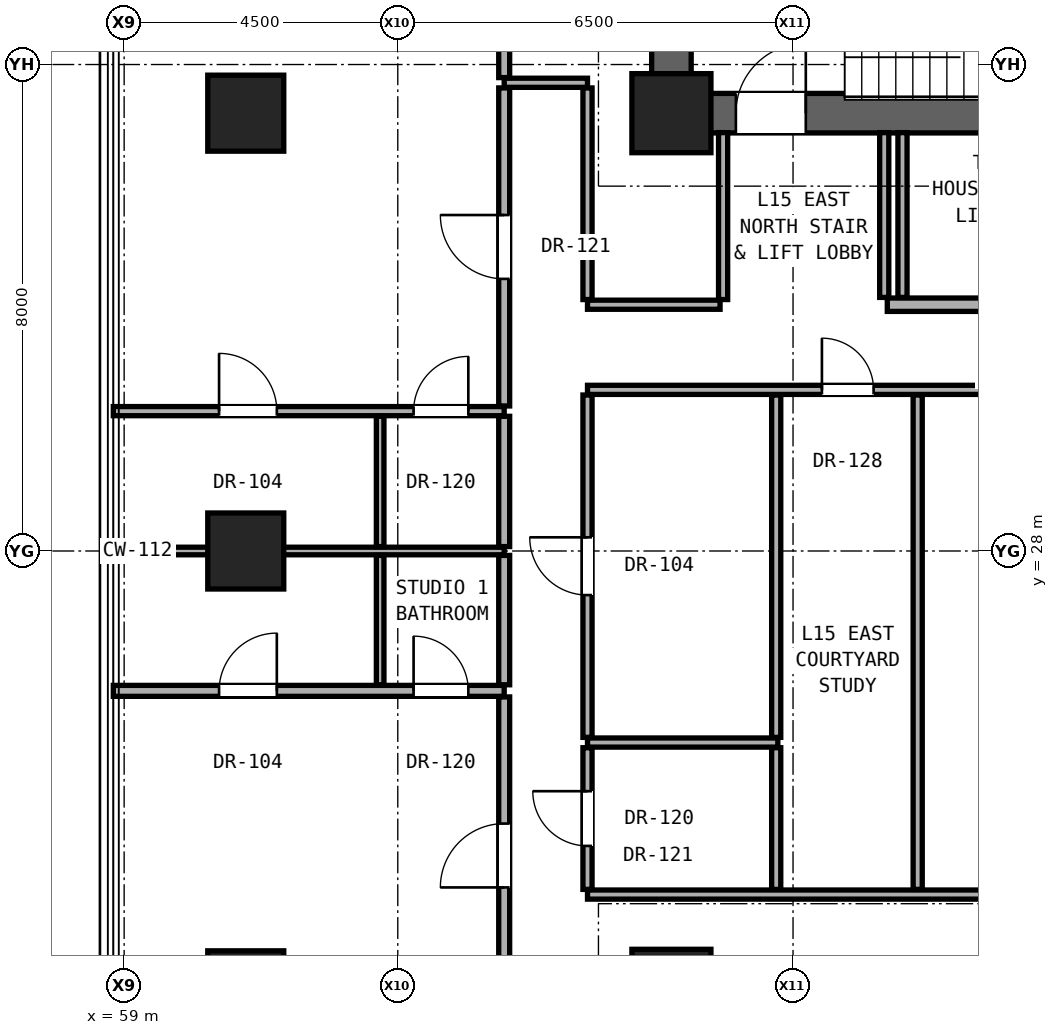
"""IFC4 building model, lengths in metres.
Left out: names, types, materials, properties, quantities, classifications, styles, units other than length and angle.
Written with IfcOpenShell. Run it as: python <this file> out.ifc"""

import sys

from ifc_helpers import new_model, si_unit, direction, frame, frame_2d, origin, origin_2d, place, context, subcontext, project, spatial, rectangle, hollow_rectangle, extrude, element, fill, save


model = new_model("IFC4")
c1 = context("Model", 3, precision=1e-05, world=origin(), true_north=direction((0.0, 1.0)))
c2 = subcontext(c1, "Body", "Model", "MODEL_VIEW")
j1 = project(units=[si_unit("LENGTHUNIT", "METRE"), si_unit("PLANEANGLEUNIT", "RADIAN")], contexts=[c1])
p1 = place(None, origin())
s1 = spatial("IfcSite", under=j1, at=p1, CompositionType="ELEMENT")
p2 = place(p1, origin())
s2 = spatial("IfcBuilding", under=s1, at=p2, CompositionType="ELEMENT")
p3 = place(p2, frame((0.0, 0.0, 55.4)))
s3 = spatial("IfcBuildingStorey", under=s2, at=p3, CompositionType="ELEMENT", Elevation=55.4)
for number, where, z_axis, x_axis in (
    (1, (68.0, 20.8, 0.0), (0.0, 0.0, 1.0), (1.0, 0.0, 0.0)),
    (2, (68.0, 35.2, 0.0), (0.0, 0.0, 1.0), (1.0, 0.0, 0.0)),
):
    element("IfcColumn", number, at=place(p3, frame(where, z_axis=z_axis, x_axis=x_axis)), inside=s3, PredefinedType="COLUMN", context=c2, shape_type="SweptSolid", body=[
        extrude(rectangle(XDim=1.3, YDim=1.3, at=origin_2d()), origin(), (0.0, 0.0, 1.0), 3.3),
    ])
for number, where, z_axis, x_axis in (
    (3, (61.0, 20.8, 0.0), (0.0, 0.0, 1.0), (1.0, 0.0, 0.0)),
    (4, (61.0, 28.0, 0.0), (0.0, 0.0, 1.0), (1.0, 0.0, 0.0)),
    (5, (61.0, 35.2, 0.0), (0.0, 0.0, 1.0), (1.0, 0.0, 0.0)),
):
    element("IfcColumn", number, at=place(p3, frame(where, z_axis=z_axis, x_axis=x_axis)), inside=s3, PredefinedType="COLUMN", context=c2, shape_type="SweptSolid", body=[
        extrude(hollow_rectangle(XDim=1.25, YDim=1.25, WallThickness=0.07, at=origin_2d()), origin(), (0.0, 0.0, 1.0), 3.3),
    ])
p4 = place(p3, frame((68.0, 35.2, 0.0), z_axis=(0.0, 0.0, 1.0), x_axis=(0.0, 1.0, 0.0)))
e6 = element("IfcWall", 6, at=p4, inside=s3, PredefinedType="SHEAR", context=c2, shape_type="SweptSolid", body=[
    extrude(rectangle(XDim=5.6, YDim=0.65, at=frame_2d((2.8, 0.0))), origin(), (0.0, 0.0, 1.0), 3.06),
])
p5 = place(p3, frame((68.0, 35.2, 0.0), z_axis=(0.0, 0.0, 1.0), x_axis=(1.0, 0.0, 0.0)))
e7 = element("IfcWall", 7, at=p5, inside=s3, PredefinedType="SHEAR", context=c2, shape_type="SweptSolid", body=[
    extrude(rectangle(XDim=17.0, YDim=0.65, at=frame_2d((8.5, 0.0))), origin(), (0.0, 0.0, 1.0), 3.06),
])
p6 = place(p5, frame((1.06, 0.0, 0.0)))
e8 = element("IfcOpeningElement", 8, at=p6, cuts=e7, PredefinedType="OPENING", context=c2, shape_type="SweptSolid", body=[
    extrude(rectangle(XDim=1.15, YDim=2.2, at=frame_2d((0.575, 1.1))), frame((0.0, 0.335, 0.0), z_axis=(0.0, -1.0, 0.0), x_axis=(1.0, 0.0, 0.0)), (0.0, 0.0, 1.0), 0.67),
])
p7 = place(p5, frame((8.75, 0.0, 0.0)))
e9 = element("IfcOpeningElement", 9, at=p7, cuts=e7, PredefinedType="OPENING", context=c2, shape_type="SweptSolid", body=[
    extrude(rectangle(XDim=1.4, YDim=2.35, at=frame_2d((0.7, 1.175))), frame((0.0, 0.335, 0.0), z_axis=(0.0, -1.0, 0.0), x_axis=(1.0, 0.0, 0.0)), (0.0, 0.0, 1.0), 0.67),
])
p8 = place(p5, frame((10.77, 0.0, 0.0)))
e10 = element("IfcOpeningElement", 10, at=p8, cuts=e7, PredefinedType="OPENING", context=c2, shape_type="SweptSolid", body=[
    extrude(rectangle(XDim=1.3, YDim=2.3, at=frame_2d((0.65, 1.15))), frame((0.0, 0.335, 0.0), z_axis=(0.0, -1.0, 0.0), x_axis=(1.0, 0.0, 0.0)), (0.0, 0.0, 1.0), 0.67),
])
p9 = place(p5, frame((12.69, 0.0, 0.0)))
e11 = element("IfcOpeningElement", 11, at=p9, cuts=e7, PredefinedType="OPENING", context=c2, shape_type="SweptSolid", body=[
    extrude(rectangle(XDim=1.3, YDim=2.3, at=frame_2d((0.65, 1.15))), frame((0.0, 0.335, 0.0), z_axis=(0.0, -1.0, 0.0), x_axis=(1.0, 0.0, 0.0)), (0.0, 0.0, 1.0), 0.67),
])
p10 = place(p5, frame((14.57, 0.0, 0.0)))
e12 = element("IfcOpeningElement", 12, at=p10, cuts=e7, PredefinedType="OPENING", context=c2, shape_type="SweptSolid", body=[
    extrude(rectangle(XDim=1.3, YDim=2.3, at=frame_2d((0.65, 1.15))), frame((0.0, 0.335, 0.0), z_axis=(0.0, -1.0, 0.0), x_axis=(1.0, 0.0, 0.0)), (0.0, 0.0, 1.0), 0.67),
])
p11 = place(p3, frame((66.62, 22.35, 0.0), z_axis=(0.0, 0.0, 1.0), x_axis=(1.0, 0.0, 0.0)))
e13 = element("IfcWall", 13, at=p11, inside=s3, PredefinedType="PARTITIONING", context=c2, shape_type="SweptSolid", body=[
    extrude(rectangle(XDim=19.63, YDim=0.15, at=frame_2d((9.815, 0.0))), origin(), (0.0, 0.0, 1.0), 2.125),
])
p12 = place(p11, frame((8.129, 0.0, 0.0)))
e14 = element("IfcOpeningElement", 14, at=p12, cuts=e13, PredefinedType="OPENING", context=c2, shape_type="SweptSolid", body=[
    extrude(rectangle(XDim=0.85, YDim=2.01, at=frame_2d((0.425, 1.005))), frame((0.0, 0.085, 0.0), z_axis=(0.0, -1.0, 0.0), x_axis=(1.0, 0.0, 0.0)), (0.0, 0.0, 1.0), 0.17),
])
p13 = place(p3, frame((66.62, 24.85, 0.0), z_axis=(0.0, 0.0, 1.0), x_axis=(1.0, 0.0, 0.0)))
e15 = element("IfcWall", 15, at=p13, inside=s3, PredefinedType="PARTITIONING", context=c2, shape_type="SweptSolid", body=[
    extrude(rectangle(XDim=3.13, YDim=0.15, at=frame_2d((1.565, 0.0))), origin(), (0.0, 0.0, 1.0), 2.125),
])
p14 = place(p3, frame((58.822, 25.7, 0.0), z_axis=(0.0, 0.0, 1.0), x_axis=(1.0, 0.0, 0.0)))
e16 = element("IfcWall", 16, at=p14, inside=s3, PredefinedType="PARTITIONING", context=c2, shape_type="SweptSolid", body=[
    extrude(rectangle(XDim=6.428, YDim=0.18, at=frame_2d((3.214, 0.0))), origin(), (0.0, 0.0, 1.0), 2.196),
])
p15 = place(p14, frame((1.739, 0.0, 0.0)))
e17 = element("IfcOpeningElement", 17, at=p15, cuts=e16, PredefinedType="OPENING", context=c2, shape_type="SweptSolid", body=[
    extrude(rectangle(XDim=0.95, YDim=2.15, at=frame_2d((0.475, 1.075))), frame((0.0, 0.1, 0.0), z_axis=(0.0, -1.0, 0.0), x_axis=(1.0, 0.0, 0.0)), (0.0, 0.0, 1.0), 0.2),
])
p16 = place(p14, frame((4.938, 0.0, 0.0)))
e18 = element("IfcOpeningElement", 18, at=p16, cuts=e16, PredefinedType="OPENING", context=c2, shape_type="SweptSolid", body=[
    extrude(rectangle(XDim=0.9, YDim=2.1, at=frame_2d((0.45, 1.05))), frame((0.0, 0.1, 0.0), z_axis=(0.0, -1.0, 0.0), x_axis=(1.0, 0.0, 0.0)), (0.0, 0.0, 1.0), 0.2),
])
p17 = place(p3, frame((58.822, 28.0, 0.0), z_axis=(0.0, 0.0, 1.0), x_axis=(1.0, 0.0, 0.0)))
e19 = element("IfcWall", 19, at=p17, inside=s3, PredefinedType="PARTITIONING", context=c2, shape_type="SweptSolid", body=[
    extrude(rectangle(XDim=6.428, YDim=0.125, at=frame_2d((3.214, 0.0))), origin(), (0.0, 0.0, 1.0), 2.196),
])
p18 = place(p3, frame((58.822, 30.3, 0.0), z_axis=(0.0, 0.0, 1.0), x_axis=(1.0, 0.0, 0.0)))
e20 = element("IfcWall", 20, at=p18, inside=s3, PredefinedType="PARTITIONING", context=c2, shape_type="SweptSolid", body=[
    extrude(rectangle(XDim=6.428, YDim=0.15, at=frame_2d((3.214, 0.0))), origin(), (0.0, 0.0, 1.0), 2.196),
])
p19 = place(p18, frame((1.739, 0.0, 0.0)))
e21 = element("IfcOpeningElement", 21, at=p19, cuts=e20, PredefinedType="OPENING", context=c2, shape_type="SweptSolid", body=[
    extrude(rectangle(XDim=0.95, YDim=2.15, at=frame_2d((0.475, 1.075))), frame((0.0, 0.085, 0.0), z_axis=(0.0, -1.0, 0.0), x_axis=(1.0, 0.0, 0.0)), (0.0, 0.0, 1.0), 0.17),
])
p20 = place(p18, frame((4.938, 0.0, 0.0)))
e22 = element("IfcOpeningElement", 22, at=p20, cuts=e20, PredefinedType="OPENING", context=c2, shape_type="SweptSolid", body=[
    extrude(rectangle(XDim=0.9, YDim=2.1, at=frame_2d((0.45, 1.05))), frame((0.0, 0.085, 0.0), z_axis=(0.0, -1.0, 0.0), x_axis=(1.0, 0.0, 0.0)), (0.0, 0.0, 1.0), 0.17),
])
p21 = place(p3, frame((66.62, 30.65, 0.0), z_axis=(0.0, 0.0, 1.0), x_axis=(1.0, 0.0, 0.0)))
e23 = element("IfcWall", 23, at=p21, inside=s3, PredefinedType="PARTITIONING", context=c2, shape_type="SweptSolid", body=[
    extrude(rectangle(XDim=19.63, YDim=0.15, at=frame_2d((9.815, 0.0))), origin(), (0.0, 0.0, 1.0), 2.125),
])
p22 = place(p21, frame((3.855, 0.0, 0.0)))
e24 = element("IfcOpeningElement", 24, at=p22, cuts=e23, PredefinedType="OPENING", context=c2, shape_type="SweptSolid", body=[
    extrude(rectangle(XDim=0.85, YDim=2.01, at=frame_2d((0.425, 1.005))), frame((0.0, 0.085, 0.0), z_axis=(0.0, -1.0, 0.0), x_axis=(1.0, 0.0, 0.0)), (0.0, 0.0, 1.0), 0.17),
])
p23 = place(p21, frame((15.209, 0.0, 0.0)))
e25 = element("IfcOpeningElement", 25, at=p23, cuts=e23, PredefinedType="OPENING", context=c2, shape_type="SweptSolid", body=[
    extrude(rectangle(XDim=0.85, YDim=2.01, at=frame_2d((0.425, 1.005))), frame((0.0, 0.085, 0.0), z_axis=(0.0, -1.0, 0.0), x_axis=(1.0, 0.0, 0.0)), (0.0, 0.0, 1.0), 0.17),
])
p24 = place(p3, frame((66.62, 32.05, 0.0), z_axis=(0.0, 0.0, 1.0), x_axis=(1.0, 0.0, 0.0)))
e26 = element("IfcWall", 26, at=p24, inside=s3, PredefinedType="PARTITIONING", context=c2, shape_type="SweptSolid", body=[
    extrude(rectangle(XDim=2.18, YDim=0.15, at=frame_2d((1.09, 0.0))), origin(), (0.0, 0.0, 1.0), 2.125),
])
p25 = place(p3, frame((71.55, 32.05, 0.0), z_axis=(0.0, 0.0, 1.0), x_axis=(1.0, 0.0, 0.0)))
e27 = element("IfcWall", 27, at=p25, inside=s3, PredefinedType="SOLIDWALL", context=c2, shape_type="SweptSolid", body=[
    extrude(rectangle(XDim=14.7, YDim=0.22, at=frame_2d((7.35, 0.0))), origin(), (0.0, 0.0, 1.0), 2.125),
])
p26 = place(p25, frame((11.39, 0.0, 0.0)))
e28 = element("IfcOpeningElement", 28, at=p26, cuts=e27, PredefinedType="OPENING", context=c2, shape_type="SweptSolid", body=[
    extrude(rectangle(XDim=0.85, YDim=2.01, at=frame_2d((0.425, 1.005))), frame((0.0, 0.12, 0.0), z_axis=(0.0, -1.0, 0.0), x_axis=(1.0, 0.0, 0.0)), (0.0, 0.0, 1.0), 0.24),
])
p27 = place(p25, frame((6.065, 0.0, 0.0)))
e29 = element("IfcOpeningElement", 29, at=p27, cuts=e27, PredefinedType="OPENING", context=c2, shape_type="SweptSolid", body=[
    extrude(rectangle(XDim=0.85, YDim=2.01, at=frame_2d((0.425, 1.005))), frame((0.0, 0.12, 0.0), z_axis=(0.0, -1.0, 0.0), x_axis=(1.0, 0.0, 0.0)), (0.0, 0.0, 1.0), 0.24),
])
p28 = place(p25, frame((1.65, 0.0, 0.0)))
e30 = element("IfcOpeningElement", 30, at=p28, cuts=e27, PredefinedType="OPENING", context=c2, shape_type="SweptSolid", body=[
    extrude(rectangle(XDim=0.85, YDim=2.01, at=frame_2d((0.425, 1.005))), frame((0.0, 0.12, 0.0), z_axis=(0.0, -1.0, 0.0), x_axis=(1.0, 0.0, 0.0)), (0.0, 0.0, 1.0), 0.24),
])
p29 = place(p3, frame((65.25, 35.7, 0.0), z_axis=(0.0, 0.0, 1.0), x_axis=(1.0, 0.0, 0.0)))
e31 = element("IfcWall", 31, at=p29, inside=s3, PredefinedType="PARTITIONING", context=c2, shape_type="SweptSolid", body=[
    extrude(rectangle(XDim=1.37, YDim=0.15, at=frame_2d((0.685, 0.0))), origin(), (0.0, 0.0, 1.0), 3.06),
])
p30 = place(p3, frame((63.21, 25.8, 0.0), z_axis=(0.0, 0.0, 1.0), x_axis=(0.0, 1.0, 0.0)))
e32 = element("IfcWall", 32, at=p30, inside=s3, PredefinedType="PARTITIONING", context=c2, shape_type="SweptSolid", body=[
    extrude(rectangle(XDim=2.127, YDim=0.125, at=frame_2d((1.064, 0.0))), origin(), (0.0, 0.0, 1.0), 2.279),
])
p31 = place(p3, frame((63.21, 28.073, 0.0), z_axis=(0.0, 0.0, 1.0), x_axis=(0.0, 1.0, 0.0)))
e33 = element("IfcWall", 33, at=p31, inside=s3, PredefinedType="PARTITIONING", context=c2, shape_type="SweptSolid", body=[
    extrude(rectangle(XDim=2.143, YDim=0.125, at=frame_2d((1.071, 0.0))), origin(), (0.0, 0.0, 1.0), 2.279),
])
p32 = place(p3, frame((65.25, 20.385, 0.0), z_axis=(0.0, 0.0, 1.0), x_axis=(0.0, 1.0, 0.0)))
e34 = element("IfcWall", 34, at=p32, inside=s3, PredefinedType="PARTITIONING", context=c2, shape_type="SweptSolid", body=[
    extrude(rectangle(XDim=5.215, YDim=0.18, at=frame_2d((2.607, 0.0))), origin(), (0.0, 0.0, 1.0), 2.452),
])
p33 = place(p32, frame((2.083, 0.0, 0.0)))
e35 = element("IfcOpeningElement", 35, at=p33, cuts=e34, PredefinedType="OPENING", context=c2, shape_type="SweptSolid", body=[
    extrude(rectangle(XDim=1.05, YDim=2.2, at=frame_2d((0.525, 1.1))), frame((0.0, 0.1, 0.0), z_axis=(0.0, -1.0, 0.0), x_axis=(1.0, 0.0, 0.0)), (0.0, 0.0, 1.0), 0.2),
])
p34 = place(p3, frame((65.25, 25.8, 0.0), z_axis=(0.0, 0.0, 1.0), x_axis=(0.0, 1.0, 0.0)))
e36 = element("IfcWall", 36, at=p34, inside=s3, PredefinedType="PARTITIONING", context=c2, shape_type="SweptSolid", body=[
    extrude(rectangle(XDim=2.127, YDim=0.18, at=frame_2d((1.064, 0.0))), origin(), (0.0, 0.0, 1.0), 2.279),
])
p35 = place(p3, frame((65.25, 28.073, 0.0), z_axis=(0.0, 0.0, 1.0), x_axis=(0.0, 1.0, 0.0)))
e37 = element("IfcWall", 37, at=p35, inside=s3, PredefinedType="PARTITIONING", context=c2, shape_type="SweptSolid", body=[
    extrude(rectangle(XDim=2.143, YDim=0.18, at=frame_2d((1.071, 0.0))), origin(), (0.0, 0.0, 1.0), 2.279),
])
p36 = place(p3, frame((65.25, 30.385, 0.0), z_axis=(0.0, 0.0, 1.0), x_axis=(0.0, 1.0, 0.0)))
e38 = element("IfcWall", 38, at=p36, inside=s3, PredefinedType="PARTITIONING", context=c2, shape_type="SweptSolid", body=[
    extrude(rectangle(XDim=5.23, YDim=0.18, at=frame_2d((2.615, 0.0))), origin(), (0.0, 0.0, 1.0), 2.452),
])
p37 = place(p36, frame((2.09, 0.0, 0.0)))
e39 = element("IfcOpeningElement", 39, at=p37, cuts=e38, PredefinedType="OPENING", context=c2, shape_type="SweptSolid", body=[
    extrude(rectangle(XDim=1.05, YDim=2.2, at=frame_2d((0.525, 1.1))), frame((0.0, 0.1, 0.0), z_axis=(0.0, -1.0, 0.0), x_axis=(1.0, 0.0, 0.0)), (0.0, 0.0, 1.0), 0.2),
])
p38 = place(p3, frame((65.25, 35.785, 0.0), z_axis=(0.0, 0.0, 1.0), x_axis=(0.0, 1.0, 0.0)))
e40 = element("IfcWall", 40, at=p38, inside=s3, PredefinedType="PARTITIONING", context=c2, shape_type="SweptSolid", body=[
    extrude(rectangle(XDim=3.443, YDim=0.18, at=frame_2d((1.722, 0.0))), origin(), (0.0, 0.0, 1.0), 2.436),
])
p39 = place(p3, frame((66.62, 22.435, 0.0), z_axis=(0.0, 0.0, 1.0), x_axis=(0.0, 1.0, 0.0)))
e41 = element("IfcWall", 41, at=p39, inside=s3, PredefinedType="PARTITIONING", context=c2, shape_type="SweptSolid", body=[
    extrude(rectangle(XDim=2.33, YDim=0.15, at=frame_2d((1.165, 0.0))), origin(), (0.0, 0.0, 1.0), 3.06),
])
p40 = place(p39, frame((0.715, 0.0, 0.0)))
e42 = element("IfcOpeningElement", 42, at=p40, cuts=e41, PredefinedType="OPENING", context=c2, shape_type="SweptSolid", body=[
    extrude(rectangle(XDim=0.9, YDim=2.1, at=frame_2d((0.45, 1.05))), frame((0.0, 0.085, 0.0), z_axis=(0.0, -1.0, 0.0), x_axis=(1.0, 0.0, 0.0)), (0.0, 0.0, 1.0), 0.17),
])
p41 = place(p3, frame((66.62, 24.935, 0.0), z_axis=(0.0, 0.0, 1.0), x_axis=(0.0, 1.0, 0.0)))
e43 = element("IfcWall", 43, at=p41, inside=s3, PredefinedType="PARTITIONING", context=c2, shape_type="SweptSolid", body=[
    extrude(rectangle(XDim=5.63, YDim=0.15, at=frame_2d((2.815, 0.0))), origin(), (0.0, 0.0, 1.0), 2.279),
])
p42 = place(p41, frame((2.34, 0.0, 0.0)))
e44 = element("IfcOpeningElement", 44, at=p42, cuts=e43, PredefinedType="OPENING", context=c2, shape_type="SweptSolid", body=[
    extrude(rectangle(XDim=0.95, YDim=2.15, at=frame_2d((0.475, 1.075))), frame((0.0, 0.085, 0.0), z_axis=(0.0, -1.0, 0.0), x_axis=(1.0, 0.0, 0.0)), (0.0, 0.0, 1.0), 0.17),
])
p43 = place(p3, frame((66.62, 32.135, 0.0), z_axis=(0.0, 0.0, 1.0), x_axis=(0.0, 1.0, 0.0)))
e45 = element("IfcWall", 45, at=p43, inside=s3, PredefinedType="PARTITIONING", context=c2, shape_type="SweptSolid", body=[
    extrude(rectangle(XDim=3.48, YDim=0.15, at=frame_2d((1.74, 0.0))), origin(), (0.0, 0.0, 1.0), 2.452),
])
p44 = place(p3, frame((68.85, 32.135, 0.0), z_axis=(0.0, 0.0, 1.0), x_axis=(0.0, 1.0, 0.0)))
e46 = element("IfcWall", 46, at=p44, inside=s3, PredefinedType="PARTITIONING", context=c2, shape_type="SweptSolid", body=[
    extrude(rectangle(XDim=2.745, YDim=0.15, at=frame_2d((1.373, 0.0))), origin(), (0.0, 0.0, 1.0), 3.06),
])
p45 = place(p3, frame((69.723, 22.435, 0.0), z_axis=(0.0, 0.0, 1.0), x_axis=(0.0, 1.0, 0.0)))
e47 = element("IfcWall", 47, at=p45, inside=s3, PredefinedType="PARTITIONING", context=c2, shape_type="SweptSolid", body=[
    extrude(rectangle(XDim=2.33, YDim=0.15, at=frame_2d((1.165, 0.0))), origin(), (0.0, 0.0, 1.0), 3.06),
])
p46 = place(p3, frame((69.723, 24.935, 0.0), z_axis=(0.0, 0.0, 1.0), x_axis=(0.0, 1.0, 0.0)))
e48 = element("IfcWall", 48, at=p46, inside=s3, PredefinedType="PARTITIONING", context=c2, shape_type="SweptSolid", body=[
    extrude(rectangle(XDim=5.63, YDim=0.15, at=frame_2d((2.815, 0.0))), origin(), (0.0, 0.0, 1.0), 2.125),
])
for number, where, z_axis, x_axis in (
    (49, (71.5, 32.17, 0.0), (0.0, 0.0, 1.0), (0.0, 1.0, 0.0)),
    (50, (71.8, 32.17, 0.0), (0.0, 0.0, 1.0), (0.0, 1.0, 0.0)),
):
    element("IfcWall", number, at=place(p3, frame(where, z_axis=z_axis, x_axis=x_axis)), inside=s3, PredefinedType="PARTITIONING", context=c2, shape_type="SweptSolid", body=[
        extrude(rectangle(XDim=2.71, YDim=0.15, at=frame_2d((1.355, 0.0))), origin(), (0.0, 0.0, 1.0), 3.06),
    ])
p47 = place(p3, frame((72.05, 22.435, 0.0), z_axis=(0.0, 0.0, 1.0), x_axis=(0.0, 1.0, 0.0)))
e51 = element("IfcWall", 51, at=p47, inside=s3, PredefinedType="PARTITIONING", context=c2, shape_type="SweptSolid", body=[
    extrude(rectangle(XDim=8.13, YDim=0.15, at=frame_2d((4.065, 0.0))), origin(), (0.0, 0.0, 1.0), 2.125),
])
p48 = place(p6, origin())
e52 = element("IfcDoor", 52, at=p48, inside=s3, OperationType="SINGLE_SWING_RIGHT", PredefinedType="DOOR", context=c2, shape_type="SweptSolid", body=[
    extrude(rectangle(XDim=1.15, YDim=2.2, at=frame_2d((0.575, 1.1))), frame((0.0, 0.025, 0.0), z_axis=(0.0, -1.0, 0.0), x_axis=(1.0, 0.0, 0.0)), (0.0, 0.0, 1.0), 0.05),
])
fill(e8, e52)
p49 = place(p40, origin())
e53 = element("IfcDoor", 53, at=p49, inside=s3, OperationType="SINGLE_SWING_RIGHT", PredefinedType="DOOR", context=c2, shape_type="SweptSolid", body=[
    extrude(rectangle(XDim=0.9, YDim=2.1, at=frame_2d((0.45, 1.05))), frame((0.0, 0.025, 0.0), z_axis=(0.0, -1.0, 0.0), x_axis=(1.0, 0.0, 0.0)), (0.0, 0.0, 1.0), 0.05),
])
fill(e42, e53)
p50 = place(p33, origin())
e54 = element("IfcDoor", 54, at=p50, inside=s3, OperationType="SINGLE_SWING_LEFT", PredefinedType="DOOR", context=c2, shape_type="SweptSolid", body=[
    extrude(rectangle(XDim=1.05, YDim=2.2, at=frame_2d((0.525, 1.1))), frame((0.0, 0.025, 0.0), z_axis=(0.0, -1.0, 0.0), x_axis=(1.0, 0.0, 0.0)), (0.0, 0.0, 1.0), 0.05),
])
fill(e35, e54)
p51 = place(p15, origin())
e55 = element("IfcDoor", 55, at=p51, inside=s3, OperationType="SINGLE_SWING_RIGHT", PredefinedType="DOOR", context=c2, shape_type="SweptSolid", body=[
    extrude(rectangle(XDim=0.95, YDim=2.15, at=frame_2d((0.475, 1.075))), frame((0.0, 0.025, 0.0), z_axis=(0.0, -1.0, 0.0), x_axis=(1.0, 0.0, 0.0)), (0.0, 0.0, 1.0), 0.05),
])
fill(e17, e55)
p52 = place(p16, origin())
e56 = element("IfcDoor", 56, at=p52, inside=s3, OperationType="SINGLE_SWING_LEFT", PredefinedType="DOOR", context=c2, shape_type="SweptSolid", body=[
    extrude(rectangle(XDim=0.9, YDim=2.1, at=frame_2d((0.45, 1.05))), frame((0.0, 0.025, 0.0), z_axis=(0.0, -1.0, 0.0), x_axis=(1.0, 0.0, 0.0)), (0.0, 0.0, 1.0), 0.05),
])
fill(e18, e56)
p53 = place(p37, origin())
e57 = element("IfcDoor", 57, at=p53, inside=s3, OperationType="SINGLE_SWING_RIGHT", PredefinedType="DOOR", context=c2, shape_type="SweptSolid", body=[
    extrude(rectangle(XDim=1.05, YDim=2.2, at=frame_2d((0.525, 1.1))), frame((0.0, 0.025, 0.0), z_axis=(0.0, -1.0, 0.0), x_axis=(1.0, 0.0, 0.0)), (0.0, 0.0, 1.0), 0.05),
])
fill(e39, e57)
p54 = place(p19, origin())
e58 = element("IfcDoor", 58, at=p54, inside=s3, OperationType="SINGLE_SWING_LEFT", PredefinedType="DOOR", context=c2, shape_type="SweptSolid", body=[
    extrude(rectangle(XDim=0.95, YDim=2.15, at=frame_2d((0.475, 1.075))), frame((0.0, 0.025, 0.0), z_axis=(0.0, -1.0, 0.0), x_axis=(1.0, 0.0, 0.0)), (0.0, 0.0, 1.0), 0.05),
])
fill(e21, e58)
p55 = place(p20, origin())
e59 = element("IfcDoor", 59, at=p55, inside=s3, OperationType="SINGLE_SWING_RIGHT", PredefinedType="DOOR", context=c2, shape_type="SweptSolid", body=[
    extrude(rectangle(XDim=0.9, YDim=2.1, at=frame_2d((0.45, 1.05))), frame((0.0, 0.025, 0.0), z_axis=(0.0, -1.0, 0.0), x_axis=(1.0, 0.0, 0.0)), (0.0, 0.0, 1.0), 0.05),
])
fill(e22, e59)
p56 = place(p42, origin())
e60 = element("IfcDoor", 60, at=p56, inside=s3, OperationType="SINGLE_SWING_RIGHT", PredefinedType="DOOR", context=c2, shape_type="SweptSolid", body=[
    extrude(rectangle(XDim=0.95, YDim=2.15, at=frame_2d((0.475, 1.075))), frame((0.0, 0.025, 0.0), z_axis=(0.0, -1.0, 0.0), x_axis=(1.0, 0.0, 0.0)), (0.0, 0.0, 1.0), 0.05),
])
fill(e44, e60)
p57 = place(p22, origin())
e61 = element("IfcDoor", 61, at=p57, inside=s3, OperationType="SINGLE_SWING_LEFT", PredefinedType="DOOR", context=c2, shape_type="SweptSolid", body=[
    extrude(rectangle(XDim=0.85, YDim=2.01, at=frame_2d((0.425, 1.005))), frame((0.0, 0.025, 0.0), z_axis=(0.0, -1.0, 0.0), x_axis=(1.0, 0.0, 0.0)), (0.0, 0.0, 1.0), 0.05),
])
fill(e24, e61)
save(model, sys.argv[1])
